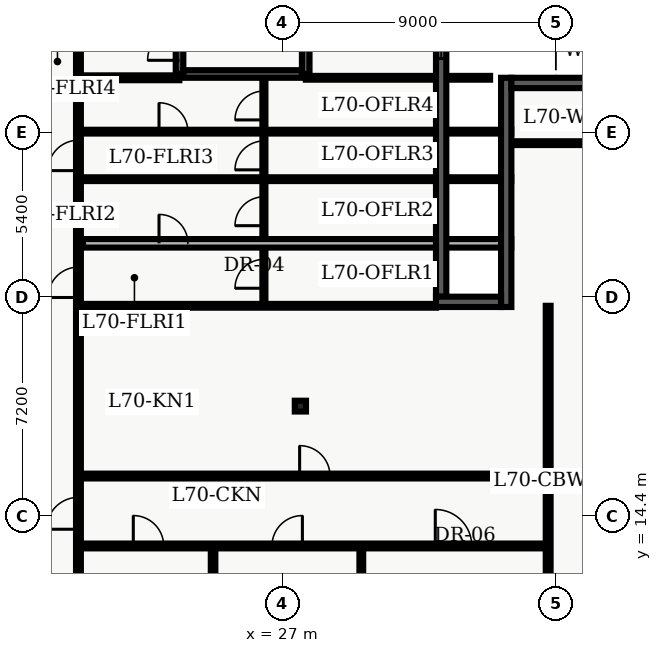
"""IFC4 building model, lengths in metres.
Left out: names, types, materials, properties, quantities, classifications, styles, units other than length and angle.
Written with IfcOpenShell. Run it as: python <this file> out.ifc"""

import sys

from ifc_helpers import new_model, entity, si_unit, converted_unit, direction, frame, origin_with_axes, origin_2d_with_axis, place, context, subcontext, project, spatial, polyline, rectangle, i_section, outline, extrude, element, fill, save


model = new_model("IFC4")
c1 = context("Model", 3, precision=1e-05, world=origin_with_axes(), true_north=direction((0.0, 1.0)))
c2 = subcontext(c1, "Body", "Model", "MODEL_VIEW")
j1 = project(units=[si_unit("LENGTHUNIT", "METRE"), converted_unit("PLANEANGLEUNIT", "DEGREE", entity("IfcPlaneAngleMeasure", 0.017), si_unit("PLANEANGLEUNIT", "RADIAN"), dimensions=[0, 0, 0, 0, 0, 0, 0])], contexts=[c1])
p1 = place(None, origin_with_axes())
s1 = spatial("IfcSite", under=j1, at=p1, CompositionType="ELEMENT")
p2 = place(p1, origin_with_axes())
s2 = spatial("IfcBuilding", under=s1, at=p2, CompositionType="ELEMENT")
p3 = place(p2, frame((0.0, 0.0, 284.1), z_axis=(0.0, 0.0, 1.0), x_axis=(1.0, 0.0, 0.0)))
s3 = spatial("IfcBuildingStorey", under=s2, at=p3, CompositionType="ELEMENT", Elevation=284.1)
p4 = place(p3, frame((23.625, 28.925, 0.0), z_axis=(0.0, 0.0, 1.0), x_axis=(0.0, 1.0, 0.0)))
e1 = element("IfcWall", 1, at=p4, inside=s3, PredefinedType="SHEAR", context=c2, shape_type="SweptSolid", body=[
    extrude(outline(polyline([(0.0, -0.125), (8.65, -0.125), (8.65, 0.125), (0.0, 0.125), (0.0, -0.125)])), origin_with_axes(), (0.0, 0.0, 1.0), 3.6),
])
p5 = place(p4, frame((0.975, 0.0, 0.0), z_axis=(0.0, 0.0, 1.0), x_axis=(1.0, 0.0, 0.0)))
e2 = element("IfcOpeningElement", 2, at=p5, cuts=e1, PredefinedType="OPENING", context=c2, shape_type="SweptSolid", body=[
    extrude(rectangle(XDim=1.05, YDim=0.27, at=origin_2d_with_axis()), origin_with_axes(), (0.0, 0.0, 1.0), 2.15),
])
p6 = place(p3, frame((27.775, 28.925, 0.0), z_axis=(0.0, 0.0, 1.0), x_axis=(0.0, 1.0, 0.0)))
e3 = element("IfcWall", 3, at=p6, inside=s3, PredefinedType="SHEAR", context=c2, shape_type="SweptSolid", body=[
    extrude(outline(polyline([(0.0, -0.125), (8.65, -0.125), (8.65, 0.125), (0.0, 0.125), (0.0, -0.125)])), origin_with_axes(), (0.0, 0.0, 1.0), 3.6),
])
p7 = place(p3, frame((23.75, 28.925, 0.0), z_axis=(0.0, 0.0, 1.0), x_axis=(1.0, 0.0, 0.0)))
e4 = element("IfcWall", 4, at=p7, inside=s3, PredefinedType="SHEAR", context=c2, shape_type="SweptSolid", body=[
    extrude(outline(polyline([(0.0, -0.125), (3.9, -0.125), (3.9, 0.125), (0.0, 0.125), (0.0, -0.125)])), origin_with_axes(), (0.0, 0.0, 1.0), 3.6),
])
p8 = place(p3, frame((27.6, 18.0, 0.0), z_axis=(0.0, 0.0, 1.0), x_axis=(1.0, 0.0, 0.0)))
e5 = element("IfcColumn", 5, at=p8, inside=s3, PredefinedType="COLUMN", context=c2, shape_type="SweptSolid", body=[
    extrude(i_section(OverallWidth=0.369, OverallDepth=0.356, WebThickness=0.011, FlangeThickness=0.018, FilletRadius=0.018, at=origin_2d_with_axis()), origin_with_axes(), (0.0, 0.0, 1.0), 3.9),
])
p9 = place(p3, frame((20.3, 7.8, 0.0), z_axis=(0.0, 0.0, 1.0), x_axis=(0.0, 1.0, 0.0)))
e6 = element("IfcWall", 6, at=p9, inside=s3, PredefinedType="PARTITIONING", context=c2, shape_type="SweptSolid", body=[
    extrude(outline(polyline([(0.0, -0.08), (32.7, -0.08), (32.7, 0.08), (0.0, 0.08), (0.0, -0.08)])), origin_with_axes(), (0.0, 0.0, 1.0), 2.64),
])
p10 = place(p9, frame((25.025, 0.0, 0.0), z_axis=(0.0, 0.0, 1.0), x_axis=(1.0, 0.0, 0.0)))
e7 = element("IfcOpeningElement", 7, at=p10, cuts=e6, PredefinedType="OPENING", context=c2, shape_type="SweptSolid", body=[
    extrude(rectangle(XDim=1.05, YDim=0.18, at=origin_2d_with_axis()), origin_with_axes(), (0.0, 0.0, 1.0), 2.15),
])
p11 = place(p9, frame((14.273, 0.0, 0.0), z_axis=(0.0, 0.0, 1.0), x_axis=(1.0, 0.0, 0.0)))
e8 = element("IfcOpeningElement", 8, at=p11, cuts=e6, PredefinedType="OPENING", context=c2, shape_type="SweptSolid", body=[
    extrude(rectangle(XDim=1.0, YDim=0.18, at=origin_2d_with_axis()), origin_with_axes(), (0.0, 0.0, 1.0), 2.15),
])
p12 = place(p9, frame((18.447, 0.0, 0.0), z_axis=(0.0, 0.0, 1.0), x_axis=(1.0, 0.0, 0.0)))
e9 = element("IfcOpeningElement", 9, at=p12, cuts=e6, PredefinedType="OPENING", context=c2, shape_type="SweptSolid", body=[
    extrude(rectangle(XDim=1.0, YDim=0.18, at=origin_2d_with_axis()), origin_with_axes(), (0.0, 0.0, 1.0), 2.15),
])
p13 = place(p9, frame((6.675, 0.0, 0.0), z_axis=(0.0, 0.0, 1.0), x_axis=(1.0, 0.0, 0.0)))
e10 = element("IfcOpeningElement", 10, at=p13, cuts=e6, PredefinedType="OPENING", context=c2, shape_type="SweptSolid", body=[
    extrude(rectangle(XDim=1.05, YDim=0.18, at=origin_2d_with_axis()), origin_with_axes(), (0.0, 0.0, 1.0), 2.15),
])
p14 = place(p3, frame((20.3, 28.8, 0.0), z_axis=(0.0, 0.0, 1.0), x_axis=(1.0, 0.0, 0.0)))
e11 = element("IfcWall", 11, at=p14, inside=s3, PredefinedType="PARTITIONING", context=c2, shape_type="SweptSolid", body=[
    extrude(outline(polyline([(0.0, -0.08), (3.32, -0.08), (3.32, 0.08), (0.0, 0.08), (0.0, -0.08)])), origin_with_axes(), (0.0, 0.0, 1.0), 2.64),
])
p15 = place(p3, frame((26.4, 21.42, 0.0), z_axis=(0.0, 0.0, 1.0), x_axis=(0.0, 1.0, 0.0)))
e12 = element("IfcWall", 12, at=p15, inside=s3, PredefinedType="PARTITIONING", context=c2, shape_type="SweptSolid", body=[
    extrude(outline(polyline([(0.0, -0.05), (7.26, -0.05), (7.26, 0.05), (0.0, 0.05), (0.0, -0.05)])), origin_with_axes(), (0.0, 0.0, 1.0), 2.64),
])
p16 = place(p15, frame((0.932, 0.0, 0.0), z_axis=(0.0, 0.0, 1.0), x_axis=(1.0, 0.0, 0.0)))
e13 = element("IfcOpeningElement", 13, at=p16, cuts=e12, PredefinedType="OPENING", context=c2, shape_type="SweptSolid", body=[
    extrude(rectangle(XDim=0.95, YDim=0.12, at=origin_2d_with_axis()), origin_with_axes(), (0.0, 0.0, 1.0), 2.15),
])
p17 = place(p15, frame((2.99, 0.0, 0.0), z_axis=(0.0, 0.0, 1.0), x_axis=(1.0, 0.0, 0.0)))
e14 = element("IfcOpeningElement", 14, at=p17, cuts=e12, PredefinedType="OPENING", context=c2, shape_type="SweptSolid", body=[
    extrude(rectangle(XDim=0.95, YDim=0.12, at=origin_2d_with_axis()), origin_with_axes(), (0.0, 0.0, 1.0), 2.15),
])
p18 = place(p15, frame((4.827, 0.0, 0.0), z_axis=(0.0, 0.0, 1.0), x_axis=(1.0, 0.0, 0.0)))
e15 = element("IfcOpeningElement", 15, at=p18, cuts=e12, PredefinedType="OPENING", context=c2, shape_type="SweptSolid", body=[
    extrude(rectangle(XDim=0.95, YDim=0.12, at=origin_2d_with_axis()), origin_with_axes(), (0.0, 0.0, 1.0), 2.15),
])
p19 = place(p15, frame((6.469, 0.0, 0.0), z_axis=(0.0, 0.0, 1.0), x_axis=(1.0, 0.0, 0.0)))
e16 = element("IfcOpeningElement", 16, at=p19, cuts=e12, PredefinedType="OPENING", context=c2, shape_type="SweptSolid", body=[
    extrude(rectangle(XDim=0.95, YDim=0.12, at=origin_2d_with_axis()), origin_with_axes(), (0.0, 0.0, 1.0), 2.15),
])
p20 = place(p3, frame((20.45, 23.355, 0.0), z_axis=(0.0, 0.0, 1.0), x_axis=(1.0, 0.0, 0.0)))
e17 = element("IfcWall", 17, at=p20, inside=s3, PredefinedType="PARTITIONING", context=c2, shape_type="SweptSolid", body=[
    extrude(outline(polyline([(0.0, -0.14), (14.085, -0.14), (14.085, 0.14), (0.0, 0.14), (0.0, -0.14)])), origin_with_axes(), (0.0, 0.0, 1.0), 2.64),
])
p21 = place(p20, frame((2.975, 0.0, 0.0), z_axis=(0.0, 0.0, 1.0), x_axis=(1.0, 0.0, 0.0)))
e18 = element("IfcOpeningElement", 18, at=p21, cuts=e17, PredefinedType="OPENING", context=c2, shape_type="SweptSolid", body=[
    extrude(rectangle(XDim=0.95, YDim=0.3, at=origin_2d_with_axis()), origin_with_axes(), (0.0, 0.0, 1.0), 2.15),
])
p22 = place(p3, frame((20.45, 25.465, 0.0), z_axis=(0.0, 0.0, 1.0), x_axis=(1.0, 0.0, 0.0)))
e19 = element("IfcWall", 19, at=p22, inside=s3, PredefinedType="PARTITIONING", context=c2, shape_type="SweptSolid", body=[
    extrude(outline(polyline([(0.0, -0.062), (14.085, -0.062), (14.085, 0.062), (0.0, 0.062), (0.0, -0.062)])), origin_with_axes(), (0.0, 0.0, 1.0), 2.64),
])
p23 = place(p3, frame((20.45, 27.028, 0.0), z_axis=(0.0, 0.0, 1.0), x_axis=(1.0, 0.0, 0.0)))
e20 = element("IfcWall", 20, at=p23, inside=s3, PredefinedType="PARTITIONING", context=c2, shape_type="SweptSolid", body=[
    extrude(outline(polyline([(0.0, -0.062), (14.085, -0.062), (14.085, 0.062), (0.0, 0.062), (0.0, -0.062)])), origin_with_axes(), (0.0, 0.0, 1.0), 2.64),
])
p24 = place(p23, frame((2.975, 0.0, 0.0), z_axis=(0.0, 0.0, 1.0), x_axis=(1.0, 0.0, 0.0)))
e21 = element("IfcOpeningElement", 21, at=p24, cuts=e20, PredefinedType="OPENING", context=c2, shape_type="SweptSolid", body=[
    extrude(rectangle(XDim=0.95, YDim=0.145, at=origin_2d_with_axis()), origin_with_axes(), (0.0, 0.0, 1.0), 2.15),
])
p25 = place(p3, frame((27.78, 28.8, 0.0), z_axis=(0.0, 0.0, 1.0), x_axis=(1.0, 0.0, 0.0)))
e22 = element("IfcWall", 22, at=p25, inside=s3, PredefinedType="PARTITIONING", context=c2, shape_type="SweptSolid", body=[
    extrude(outline(polyline([(0.0, -0.062), (6.06, -0.062), (6.06, 0.062), (0.0, 0.062), (0.0, -0.062)])), origin_with_axes(), (0.0, 0.0, 1.0), 2.64),
])
p26 = place(p3, frame((20.3, 13.4, 0.0), z_axis=(0.0, 0.0, 1.0), x_axis=(1.0, 0.0, 0.0)))
e23 = element("IfcWall", 23, at=p26, inside=s3, PredefinedType="PARTITIONING", context=c2, shape_type="SweptSolid", body=[
    extrude(outline(polyline([(0.0, -0.08), (15.45, -0.08), (15.45, 0.08), (0.0, 0.08), (0.0, -0.08)])), origin_with_axes(), (0.0, 0.0, 1.0), 2.64),
])
p27 = place(p26, frame((2.304, 0.0, 0.0), z_axis=(0.0, 0.0, 1.0), x_axis=(1.0, 0.0, 0.0)))
e24 = element("IfcOpeningElement", 24, at=p27, cuts=e23, PredefinedType="OPENING", context=c2, shape_type="SweptSolid", body=[
    extrude(rectangle(XDim=1.0, YDim=0.18, at=origin_2d_with_axis()), origin_with_axes(), (0.0, 0.0, 1.0), 2.15),
])
p28 = place(p26, frame((6.866, 0.0, 0.0), z_axis=(0.0, 0.0, 1.0), x_axis=(1.0, 0.0, 0.0)))
e25 = element("IfcOpeningElement", 25, at=p28, cuts=e23, PredefinedType="OPENING", context=c2, shape_type="SweptSolid", body=[
    extrude(rectangle(XDim=1.0, YDim=0.18, at=origin_2d_with_axis()), origin_with_axes(), (0.0, 0.0, 1.0), 2.15),
])
p29 = place(p26, frame((12.337, 0.0, 0.0), z_axis=(0.0, 0.0, 1.0), x_axis=(1.0, 0.0, 0.0)))
e26 = element("IfcOpeningElement", 26, at=p29, cuts=e23, PredefinedType="OPENING", context=c2, shape_type="SweptSolid", body=[
    extrude(rectangle(XDim=1.2, YDim=0.18, at=origin_2d_with_axis()), origin_with_axes(), (0.0, 0.0, 1.0), 2.2),
])
p30 = place(p3, frame((20.3, 15.7, 0.0), z_axis=(0.0, 0.0, 1.0), x_axis=(1.0, 0.0, 0.0)))
e27 = element("IfcWall", 27, at=p30, inside=s3, PredefinedType="PARTITIONING", context=c2, shape_type="SweptSolid", body=[
    extrude(outline(polyline([(0.0, -0.08), (15.45, -0.08), (15.45, 0.08), (0.0, 0.08), (0.0, -0.08)])), origin_with_axes(), (0.0, 0.0, 1.0), 2.64),
])
p31 = place(p30, frame((7.775, 0.0, 0.0), z_axis=(0.0, 0.0, 1.0), x_axis=(1.0, 0.0, 0.0)))
e28 = element("IfcOpeningElement", 28, at=p31, cuts=e27, PredefinedType="OPENING", context=c2, shape_type="SweptSolid", body=[
    extrude(rectangle(XDim=1.0, YDim=0.18, at=origin_2d_with_axis()), origin_with_axes(), (0.0, 0.0, 1.0), 2.15),
])
p32 = place(p3, frame((35.75, 4.35, 0.0), z_axis=(0.0, 0.0, 1.0), x_axis=(0.0, 1.0, 0.0)))
e29 = element("IfcWall", 29, at=p32, inside=s3, PredefinedType="PARTITIONING", context=c2, shape_type="SweptSolid", body=[
    extrude(outline(polyline([(0.0, -0.08), (16.95, -0.08), (16.95, 0.08), (0.0, 0.08), (0.0, -0.08)])), origin_with_axes(), (0.0, 0.0, 1.0), 2.64),
])
p33 = place(p3, frame((24.728, 0.335, 0.0), z_axis=(0.0, 0.0, 1.0), x_axis=(0.0, 1.0, 0.0)))
e30 = element("IfcWall", 30, at=p33, inside=s3, PredefinedType="PARTITIONING", context=c2, shape_type="SweptSolid", body=[
    extrude(outline(polyline([(0.0, -0.075), (12.945, -0.075), (12.945, 0.075), (0.0, 0.075), (0.0, -0.075)])), origin_with_axes(), (0.0, 0.0, 1.0), 2.64),
])
p34 = place(p3, frame((29.604, 0.335, 0.0), z_axis=(0.0, 0.0, 1.0), x_axis=(0.0, 1.0, 0.0)))
e31 = element("IfcWall", 31, at=p34, inside=s3, PredefinedType="PARTITIONING", context=c2, shape_type="SweptSolid", body=[
    extrude(outline(polyline([(0.0, -0.062), (12.945, -0.062), (12.945, 0.062), (0.0, 0.062), (0.0, -0.062)])), origin_with_axes(), (0.0, 0.0, 1.0), 2.64),
])
p35 = place(p3, frame((34.535, 26.65, 0.0), z_axis=(0.0, 0.0, 1.0), x_axis=(1.0, 0.0, 0.0)))
e32 = element("IfcWall", 32, at=p35, inside=s3, PredefinedType="PARTITIONING", context=c2, shape_type="SweptSolid", body=[
    extrude(outline(polyline([(0.0, -0.062), (12.995, -0.062), (12.995, 0.062), (0.0, 0.062), (0.0, -0.062)])), origin_with_axes(), (0.0, 0.0, 1.0), 2.64),
])
p36 = place(p35, frame((8.465, 0.0, 0.0), z_axis=(0.0, 0.0, 1.0), x_axis=(1.0, 0.0, 0.0)))
e33 = element("IfcOpeningElement", 33, at=p36, cuts=e32, PredefinedType="OPENING", context=c2, shape_type="SweptSolid", body=[
    extrude(rectangle(XDim=1.0, YDim=0.145, at=origin_2d_with_axis()), origin_with_axes(), (0.0, 0.0, 1.0), 2.15),
])
p37 = place(p3, frame((20.3, 21.3, 0.0), z_axis=(0.0, 0.0, 1.0), x_axis=(1.0, 0.0, 0.0)))
e34 = element("IfcWall", 34, at=p37, inside=s3, PredefinedType="PARTITIONING", context=c2, shape_type="SweptSolid", body=[
    extrude(outline(polyline([(0.0, -0.062), (11.765, -0.062), (11.765, 0.062), (0.0, 0.062), (0.0, -0.062)])), origin_with_axes(), (0.0, 0.0, 1.0), 2.64),
])
p38 = place(p3, frame((34.37, 21.26, 0.0), z_axis=(0.0, 0.0, 1.0), x_axis=(0.0, 1.0, 0.0)))
e35 = element("IfcWall", 35, at=p38, inside=s3, PredefinedType="SOLIDWALL", context=c2, shape_type="SweptSolid", body=[
    extrude(outline(polyline([(0.0, -0.17), (7.54, -0.17), (7.54, 0.17), (0.0, 0.17), (0.0, -0.17)])), origin_with_axes(), (0.0, 0.0, 1.0), 3.6),
])
p39 = place(p3, frame((34.54, 28.63, 0.0), z_axis=(0.0, 0.0, 1.0), x_axis=(1.0, 0.0, 0.0)))
e36 = element("IfcWall", 36, at=p39, inside=s3, PredefinedType="SOLIDWALL", context=c2, shape_type="SweptSolid", body=[
    extrude(outline(polyline([(0.0, -0.17), (13.16, -0.17), (13.16, 0.17), (0.0, 0.17), (0.0, -0.17)])), origin_with_axes(), (0.0, 0.0, 1.0), 3.6),
])
p40 = place(p39, frame((3.59, 0.0, 0.45), z_axis=(0.0, 0.0, 1.0), x_axis=(1.0, 0.0, 0.0)))
e37 = element("IfcOpeningElement", 37, at=p40, cuts=e36, PredefinedType="OPENING", context=c2, shape_type="SweptSolid", body=[
    extrude(rectangle(XDim=1.5, YDim=0.36, at=origin_2d_with_axis()), origin_with_axes(), (0.0, 0.0, 1.0), 2.1),
])
p41 = place(p39, frame((9.57, 0.0, 0.45), z_axis=(0.0, 0.0, 1.0), x_axis=(1.0, 0.0, 0.0)))
e38 = element("IfcOpeningElement", 38, at=p41, cuts=e36, PredefinedType="OPENING", context=c2, shape_type="SweptSolid", body=[
    extrude(rectangle(XDim=1.5, YDim=0.36, at=origin_2d_with_axis()), origin_with_axes(), (0.0, 0.0, 1.0), 2.1),
])
p42 = place(p3, frame((32.23, 41.82, 0.0), z_axis=(0.0, 0.0, 1.0), x_axis=(0.0, -1.0, 0.0)))
e39 = element("IfcWall", 39, at=p42, inside=s3, PredefinedType="SOLIDWALL", context=c2, shape_type="SweptSolid", body=[
    extrude(outline(polyline([(0.0, -0.17), (20.22, -0.17), (20.22, 0.17), (0.0, 0.17), (0.0, -0.17)])), origin_with_axes(), (0.0, 0.0, 1.0), 3.6),
])
p43 = place(p42, frame((7.732, 0.0, 0.45), z_axis=(0.0, 0.0, 1.0), x_axis=(1.0, 0.0, 0.0)))
e40 = element("IfcOpeningElement", 40, at=p43, cuts=e39, PredefinedType="OPENING", context=c2, shape_type="SweptSolid", body=[
    extrude(rectangle(XDim=1.5, YDim=0.36, at=origin_2d_with_axis()), origin_with_axes(), (0.0, 0.0, 1.0), 2.1),
])
p44 = place(p42, frame((11.637, 0.0, 0.45), z_axis=(0.0, 0.0, 1.0), x_axis=(1.0, 0.0, 0.0)))
e41 = element("IfcOpeningElement", 41, at=p44, cuts=e39, PredefinedType="OPENING", context=c2, shape_type="SweptSolid", body=[
    extrude(rectangle(XDim=1.5, YDim=0.36, at=origin_2d_with_axis()), origin_with_axes(), (0.0, 0.0, 1.0), 2.1),
])
p45 = place(p3, frame((32.06, 21.43, 0.0), z_axis=(0.0, 0.0, 1.0), x_axis=(1.0, 0.0, 0.0)))
e42 = element("IfcWall", 42, at=p45, inside=s3, PredefinedType="SOLIDWALL", context=c2, shape_type="SweptSolid", body=[
    extrude(outline(polyline([(0.0, -0.17), (2.14, -0.17), (2.14, 0.17), (0.0, 0.17), (0.0, -0.17)])), origin_with_axes(), (0.0, 0.0, 1.0), 3.6),
])
p46 = place(p4, frame((0.975, 0.0, 0.0), z_axis=(0.0, 0.0, 1.0), x_axis=(1.0, 0.0, 0.0)))
e43 = element("IfcDoor", 43, at=p46, inside=s3, OperationType="SINGLE_SWING_LEFT", PredefinedType="DOOR", context=c2, shape_type="SweptSolid", body=[
    extrude(rectangle(XDim=1.05, YDim=0.09, at=origin_2d_with_axis()), origin_with_axes(), (0.0, 0.0, 1.0), 2.15),
])
fill(e2, e43)
p47 = place(p15, frame((0.932, 0.0, 0.0), z_axis=(0.0, 0.0, 1.0), x_axis=(1.0, 0.0, 0.0)))
e44 = element("IfcDoor", 44, at=p47, inside=s3, OperationType="SINGLE_SWING_LEFT", PredefinedType="DOOR", context=c2, shape_type="SweptSolid", body=[
    extrude(rectangle(XDim=0.95, YDim=0.06, at=origin_2d_with_axis()), origin_with_axes(), (0.0, 0.0, 1.0), 2.15),
])
fill(e13, e44)
p48 = place(p9, frame((14.273, 0.0, 0.0), z_axis=(0.0, 0.0, 1.0), x_axis=(1.0, 0.0, 0.0)))
e45 = element("IfcDoor", 45, at=p48, inside=s3, OperationType="SINGLE_SWING_LEFT", PredefinedType="DOOR", context=c2, shape_type="SweptSolid", body=[
    extrude(rectangle(XDim=1.0, YDim=0.09, at=origin_2d_with_axis()), origin_with_axes(), (0.0, 0.0, 1.0), 2.15),
])
fill(e8, e45)
p49 = place(p15, frame((2.99, 0.0, 0.0), z_axis=(0.0, 0.0, 1.0), x_axis=(1.0, 0.0, 0.0)))
e46 = element("IfcDoor", 46, at=p49, inside=s3, OperationType="SINGLE_SWING_LEFT", PredefinedType="DOOR", context=c2, shape_type="SweptSolid", body=[
    extrude(rectangle(XDim=0.95, YDim=0.06, at=origin_2d_with_axis()), origin_with_axes(), (0.0, 0.0, 1.0), 2.15),
])
fill(e14, e46)
p50 = place(p20, frame((2.975, 0.0, 0.0), z_axis=(0.0, 0.0, 1.0), x_axis=(1.0, 0.0, 0.0)))
e47 = element("IfcDoor", 47, at=p50, inside=s3, OperationType="SINGLE_SWING_LEFT", PredefinedType="DOOR", context=c2, shape_type="SweptSolid", body=[
    extrude(rectangle(XDim=0.95, YDim=0.09, at=origin_2d_with_axis()), origin_with_axes(), (0.0, 0.0, 1.0), 2.15),
])
fill(e18, e47)
p51 = place(p15, frame((4.827, 0.0, 0.0), z_axis=(0.0, 0.0, 1.0), x_axis=(1.0, 0.0, 0.0)))
e48 = element("IfcDoor", 48, at=p51, inside=s3, OperationType="SINGLE_SWING_LEFT", PredefinedType="DOOR", context=c2, shape_type="SweptSolid", body=[
    extrude(rectangle(XDim=0.95, YDim=0.06, at=origin_2d_with_axis()), origin_with_axes(), (0.0, 0.0, 1.0), 2.15),
])
fill(e15, e48)
p52 = place(p9, frame((18.447, 0.0, 0.0), z_axis=(0.0, 0.0, 1.0), x_axis=(1.0, 0.0, 0.0)))
e49 = element("IfcDoor", 49, at=p52, inside=s3, OperationType="SINGLE_SWING_LEFT", PredefinedType="DOOR", context=c2, shape_type="SweptSolid", body=[
    extrude(rectangle(XDim=1.0, YDim=0.09, at=origin_2d_with_axis()), origin_with_axes(), (0.0, 0.0, 1.0), 2.15),
])
fill(e9, e49)
p53 = place(p15, frame((6.469, 0.0, 0.0), z_axis=(0.0, 0.0, 1.0), x_axis=(1.0, 0.0, 0.0)))
e50 = element("IfcDoor", 50, at=p53, inside=s3, OperationType="SINGLE_SWING_LEFT", PredefinedType="DOOR", context=c2, shape_type="SweptSolid", body=[
    extrude(rectangle(XDim=0.95, YDim=0.06, at=origin_2d_with_axis()), origin_with_axes(), (0.0, 0.0, 1.0), 2.15),
])
fill(e16, e50)
p54 = place(p23, frame((2.975, 0.0, 0.0), z_axis=(0.0, 0.0, 1.0), x_axis=(1.0, 0.0, 0.0)))
e51 = element("IfcDoor", 51, at=p54, inside=s3, OperationType="SINGLE_SWING_LEFT", PredefinedType="DOOR", context=c2, shape_type="SweptSolid", body=[
    extrude(rectangle(XDim=0.95, YDim=0.075, at=origin_2d_with_axis()), origin_with_axes(), (0.0, 0.0, 1.0), 2.15),
])
fill(e21, e51)
p55 = place(p9, frame((6.675, 0.0, 0.0), z_axis=(0.0, 0.0, 1.0), x_axis=(1.0, 0.0, 0.0)))
e52 = element("IfcDoor", 52, at=p55, inside=s3, OperationType="SINGLE_SWING_LEFT", PredefinedType="DOOR", context=c2, shape_type="SweptSolid", body=[
    extrude(rectangle(XDim=1.05, YDim=0.09, at=origin_2d_with_axis()), origin_with_axes(), (0.0, 0.0, 1.0), 2.15),
])
fill(e10, e52)
p56 = place(p26, frame((2.304, 0.0, 0.0), z_axis=(0.0, 0.0, 1.0), x_axis=(1.0, 0.0, 0.0)))
e53 = element("IfcDoor", 53, at=p56, inside=s3, OperationType="SINGLE_SWING_LEFT", PredefinedType="DOOR", context=c2, shape_type="SweptSolid", body=[
    extrude(rectangle(XDim=1.0, YDim=0.09, at=origin_2d_with_axis()), origin_with_axes(), (0.0, 0.0, 1.0), 2.15),
])
fill(e24, e53)
p57 = place(p26, frame((6.866, 0.0, 0.0), z_axis=(0.0, 0.0, 1.0), x_axis=(1.0, 0.0, 0.0)))
e54 = element("IfcDoor", 54, at=p57, inside=s3, OperationType="SINGLE_SWING_RIGHT", PredefinedType="DOOR", context=c2, shape_type="SweptSolid", body=[
    extrude(rectangle(XDim=1.0, YDim=0.09, at=origin_2d_with_axis()), origin_with_axes(), (0.0, 0.0, 1.0), 2.15),
])
fill(e25, e54)
p58 = place(p26, frame((12.337, 0.0, 0.0), z_axis=(0.0, 0.0, 1.0), x_axis=(1.0, 0.0, 0.0)))
e55 = element("IfcDoor", 55, at=p58, inside=s3, OperationType="SINGLE_SWING_LEFT", PredefinedType="DOOR", context=c2, shape_type="SweptSolid", body=[
    extrude(rectangle(XDim=1.2, YDim=0.09, at=origin_2d_with_axis()), origin_with_axes(), (0.0, 0.0, 1.0), 2.2),
])
fill(e26, e55)
p59 = place(p30, frame((7.775, 0.0, 0.0), z_axis=(0.0, 0.0, 1.0), x_axis=(1.0, 0.0, 0.0)))
e56 = element("IfcDoor", 56, at=p59, inside=s3, OperationType="SINGLE_SWING_LEFT", PredefinedType="DOOR", context=c2, shape_type="SweptSolid", body=[
    extrude(rectangle(XDim=1.0, YDim=0.09, at=origin_2d_with_axis()), origin_with_axes(), (0.0, 0.0, 1.0), 2.15),
])
fill(e28, e56)
p60 = place(p42, frame((11.637, 0.0, 0.45), z_axis=(0.0, 0.0, 1.0), x_axis=(1.0, 0.0, 0.0)))
e57 = element("IfcWindow", 57, at=p60, inside=s3, PredefinedType="WINDOW", context=c2, shape_type="SweptSolid", body=[
    extrude(rectangle(XDim=1.5, YDim=0.09, at=origin_2d_with_axis()), origin_with_axes(), (0.0, 0.0, 1.0), 2.1),
])
fill(e41, e57)
save(model, sys.argv[1])
